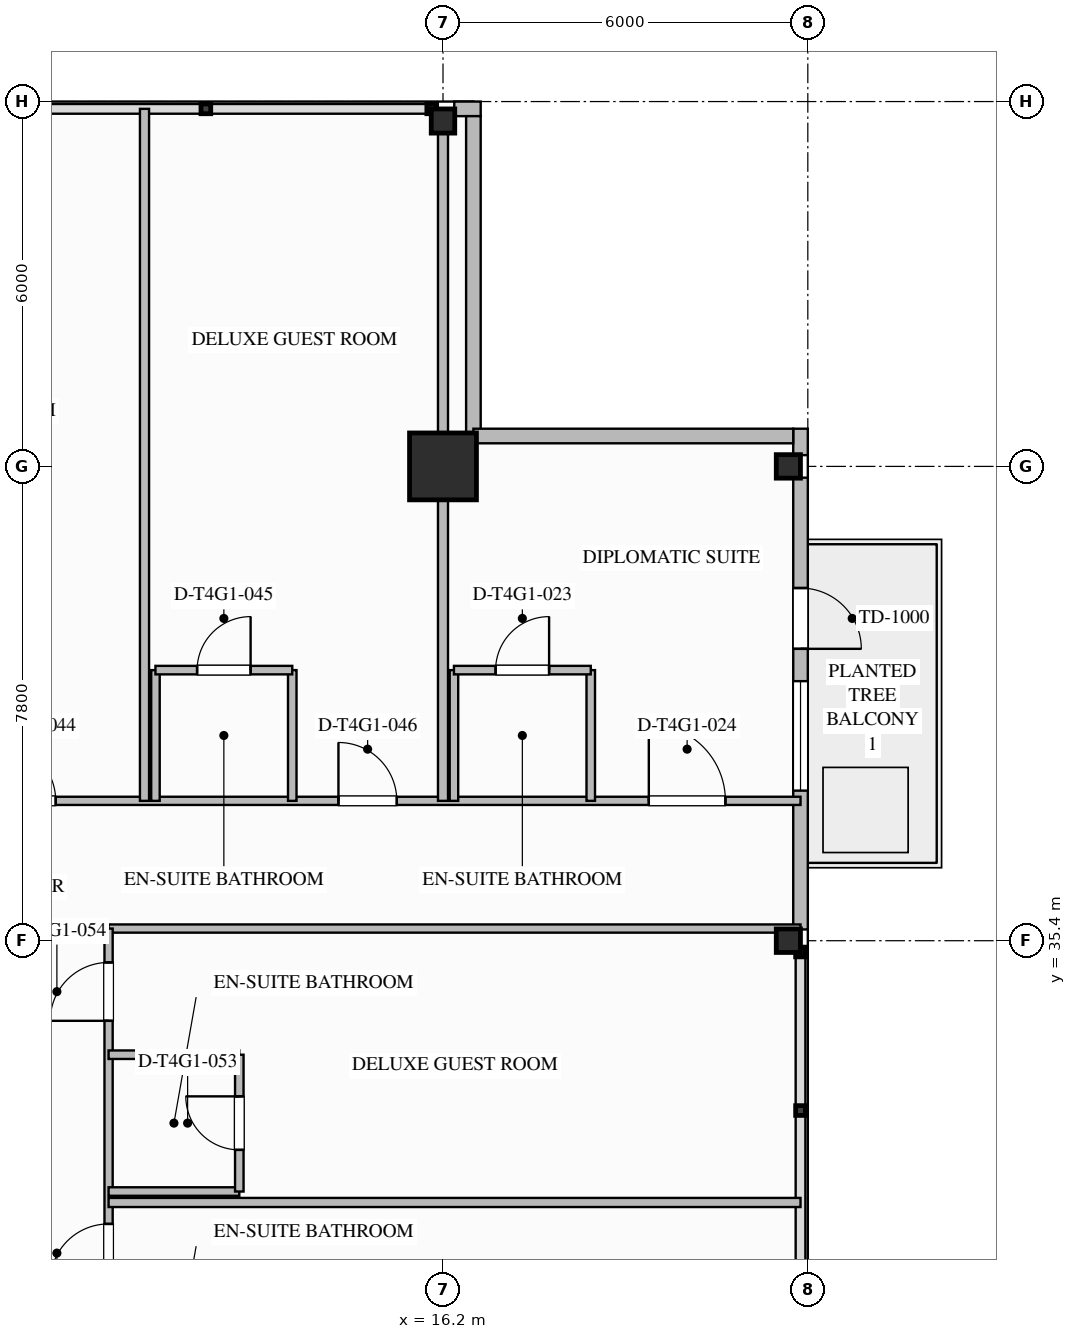
"""IFC4 building model, lengths in metres.
Left out: names, types, materials, properties, quantities, classifications, styles, units other than length and angle.
Written with IfcOpenShell. Run it as: python <this file> out.ifc"""

import sys

from ifc_helpers import new_model, si_unit, direction, frame, frame_2d, origin, origin_2d, place, context, subcontext, project, spatial, rectangle, i_section, extrude, element, fill, save


model = new_model("IFC4")
c1 = context("Model", 3, precision=1e-05, world=origin(), true_north=direction((0.0, 1.0)))
c2 = subcontext(c1, "Body", "Model", "MODEL_VIEW")
j1 = project(units=[si_unit("LENGTHUNIT", "METRE"), si_unit("PLANEANGLEUNIT", "RADIAN")], contexts=[c1])
p1 = place(None, origin())
s1 = spatial("IfcSite", under=j1, at=p1, CompositionType="ELEMENT")
p2 = place(p1, origin())
s2 = spatial("IfcBuilding", under=s1, at=p2, CompositionType="ELEMENT")
p3 = place(p2, frame((0.0, 0.0, 205.1)))
s3 = spatial("IfcBuildingStorey", under=s2, at=p3, CompositionType="ELEMENT", Elevation=205.1)
p4 = place(p3, frame((16.2, 43.2, 0.0), z_axis=(0.0, 0.0, 1.0), x_axis=(1.0, 0.0, 0.0)))
e1 = element("IfcColumn", 1, at=p4, inside=s3, PredefinedType="COLUMN", context=c2, shape_type="SweptSolid", body=[
    extrude(rectangle(XDim=1.1, YDim=1.1, at=origin_2d()), origin(), (0.0, 0.0, 1.0), 3.6),
])
for number, where, z_axis, x_axis in (
    (2, (21.88, 35.4, 0.0), (0.0, 0.0, 1.0), (1.0, 0.0, 0.0)),
    (3, (21.88, 43.2, 0.0), (0.0, 0.0, 1.0), (1.0, 0.0, 0.0)),
    (4, (16.2, 48.88, 0.0), (0.0, 0.0, 1.0), (0.0, 1.0, 0.0)),
):
    element("IfcColumn", number, at=place(p3, frame(where, z_axis=z_axis, x_axis=x_axis)), inside=s3, PredefinedType="COLUMN", context=c2, shape_type="SweptSolid", body=[
        extrude(i_section(OverallWidth=0.397, OverallDepth=0.387, WebThickness=0.021, FlangeThickness=0.033, FilletRadius=0.025, at=origin_2d()), origin(), (0.0, 0.0, 1.0), 3.597),
    ])
p5 = place(p3, frame((22.08, 43.015, 0.0), z_axis=(0.0, 0.0, 1.0), x_axis=(0.0, -1.0, 0.0)))
e5 = element("IfcWall", 5, at=p5, inside=s3, PredefinedType="STANDARD", context=c2, shape_type="SweptSolid", body=[
    extrude(rectangle(XDim=7.429, YDim=0.24, at=frame_2d((3.715, 0.0))), origin(), (0.0, 0.0, 1.0), 2.803),
])
p6 = place(p5, frame((1.815, 0.0, 0.0)))
e6 = element("IfcOpeningElement", 6, at=p6, cuts=e5, PredefinedType="OPENING", context=c2, shape_type="SweptSolid", body=[
    extrude(rectangle(XDim=1.0, YDim=2.2, at=frame_2d((0.5, 1.1))), frame((0.0, 0.13, 0.0), z_axis=(0.0, -1.0, 0.0), x_axis=(1.0, 0.0, 0.0)), (0.0, 0.0, 1.0), 0.26),
])
p7 = place(p5, frame((3.346, 0.0, 0.75)))
e7 = element("IfcOpeningElement", 7, at=p7, cuts=e5, PredefinedType="OPENING", context=c2, shape_type="SweptSolid", body=[
    extrude(rectangle(XDim=1.8, YDim=1.953, at=frame_2d((0.9, 0.977))), frame((0.0, 0.13, 0.0), z_axis=(0.0, -1.0, 0.0), x_axis=(1.0, 0.0, 0.0)), (0.0, 0.0, 1.0), 0.26),
])
for number, where, z_axis, x_axis in (
    (8, (22.08, 43.82, 0.0), (0.0, 0.0, 1.0), (0.0, -1.0, 0.0)),
    (9, (16.385, 49.08, 0.0), (0.0, 0.0, 1.0), (1.0, 0.0, 0.0)),
):
    element("IfcWall", number, at=place(p3, frame(where, z_axis=z_axis, x_axis=x_axis)), inside=s3, PredefinedType="STANDARD", context=c2, shape_type="SweptSolid", body=[
        extrude(rectangle(XDim=0.435, YDim=0.24, at=frame_2d((0.217, 0.0))), origin(), (0.0, 0.0, 1.0), 3.34),
    ])
for number, where, z_axis, x_axis in (
    (10, (16.7, 48.96, 0.0), (0.0, 0.0, 1.0), (0.0, -1.0, 0.0)),
    (11, (16.7, 43.7, 0.0), (0.0, 0.0, 1.0), (1.0, 0.0, 0.0)),
):
    element("IfcWall", number, at=place(p3, frame(where, z_axis=z_axis, x_axis=x_axis)), inside=s3, PredefinedType="STANDARD", context=c2, shape_type="SweptSolid", body=[
        extrude(rectangle(XDim=5.26, YDim=0.24, at=frame_2d((2.63, 0.0))), origin(), (0.0, 0.0, 1.0), 3.34),
    ])
p8 = place(p3, frame((-16.2, 37.7, 0.0), z_axis=(0.0, 0.0, 1.0), x_axis=(1.0, 0.0, 0.0)))
e12 = element("IfcWall", 12, at=p8, inside=s3, PredefinedType="PARTITIONING", context=c2, shape_type="SweptSolid", body=[
    extrude(rectangle(XDim=38.28, YDim=0.135, at=frame_2d((19.14, 0.0))), origin(), (0.0, 0.0, 1.0), 3.34),
])
p9 = place(p8, frame((35.785, 0.0, 0.0)))
e13 = element("IfcOpeningElement", 13, at=p9, cuts=e12, PredefinedType="OPENING", context=c2, shape_type="SweptSolid", body=[
    extrude(rectangle(XDim=1.26, YDim=2.2, at=frame_2d((0.63, 1.1))), frame((0.0, 0.077, 0.0), z_axis=(0.0, -1.0, 0.0), x_axis=(1.0, 0.0, 0.0)), (0.0, 0.0, 1.0), 0.155),
])
p10 = place(p8, frame((3.189, 0.0, 0.0)))
e14 = element("IfcOpeningElement", 14, at=p10, cuts=e12, PredefinedType="OPENING", context=c2, shape_type="SweptSolid", body=[
    extrude(rectangle(XDim=0.96, YDim=2.15, at=frame_2d((0.48, 1.075))), frame((0.0, 0.077, 0.0), z_axis=(0.0, -1.0, 0.0), x_axis=(1.0, 0.0, 0.0)), (0.0, 0.0, 1.0), 0.155),
])
p11 = place(p8, frame((8.379, 0.0, 0.0)))
e15 = element("IfcOpeningElement", 15, at=p11, cuts=e12, PredefinedType="OPENING", context=c2, shape_type="SweptSolid", body=[
    extrude(rectangle(XDim=0.96, YDim=2.15, at=frame_2d((0.48, 1.075))), frame((0.0, 0.077, 0.0), z_axis=(0.0, -1.0, 0.0), x_axis=(1.0, 0.0, 0.0)), (0.0, 0.0, 1.0), 0.155),
])
p12 = place(p8, frame((14.025, 0.0, 0.0)))
e16 = element("IfcOpeningElement", 16, at=p12, cuts=e12, PredefinedType="OPENING", context=c2, shape_type="SweptSolid", body=[
    extrude(rectangle(XDim=0.96, YDim=2.15, at=frame_2d((0.48, 1.075))), frame((0.0, 0.077, 0.0), z_axis=(0.0, -1.0, 0.0), x_axis=(1.0, 0.0, 0.0)), (0.0, 0.0, 1.0), 0.155),
])
p13 = place(p8, frame((18.18, 0.0, 0.0)))
e17 = element("IfcOpeningElement", 17, at=p13, cuts=e12, PredefinedType="OPENING", context=c2, shape_type="SweptSolid", body=[
    extrude(rectangle(XDim=1.02, YDim=2.15, at=frame_2d((0.51, 1.075))), frame((0.0, 0.077, 0.0), z_axis=(0.0, -1.0, 0.0), x_axis=(1.0, 0.0, 0.0)), (0.0, 0.0, 1.0), 0.155),
])
p14 = place(p8, frame((25.071, 0.0, 0.0)))
e18 = element("IfcOpeningElement", 18, at=p14, cuts=e12, PredefinedType="OPENING", context=c2, shape_type="SweptSolid", body=[
    extrude(rectangle(XDim=0.96, YDim=2.15, at=frame_2d((0.48, 1.075))), frame((0.0, 0.077, 0.0), z_axis=(0.0, -1.0, 0.0), x_axis=(1.0, 0.0, 0.0)), (0.0, 0.0, 1.0), 0.155),
])
p15 = place(p8, frame((30.68, 0.0, 0.0)))
e19 = element("IfcOpeningElement", 19, at=p15, cuts=e12, PredefinedType="OPENING", context=c2, shape_type="SweptSolid", body=[
    extrude(rectangle(XDim=0.96, YDim=2.15, at=frame_2d((0.48, 1.075))), frame((0.0, 0.077, 0.0), z_axis=(0.0, -1.0, 0.0), x_axis=(1.0, 0.0, 0.0)), (0.0, 0.0, 1.0), 0.155),
])
p16 = place(p3, frame((10.7, 35.6, 0.0), z_axis=(0.0, 0.0, 1.0), x_axis=(1.0, 0.0, 0.0)))
e20 = element("IfcWall", 20, at=p16, inside=s3, PredefinedType="PARTITIONING", context=c2, shape_type="SweptSolid", body=[
    extrude(rectangle(XDim=11.38, YDim=0.135, at=frame_2d((5.69, 0.0))), origin(), (0.0, 0.0, 1.0), 2.717),
])
p17 = place(p3, frame((10.7, 18.4, 0.0), z_axis=(0.0, 0.0, 1.0), x_axis=(0.0, 1.0, 0.0)))
e21 = element("IfcWall", 21, at=p17, inside=s3, PredefinedType="PARTITIONING", context=c2, shape_type="SweptSolid", body=[
    extrude(rectangle(XDim=17.2, YDim=0.135, at=frame_2d((8.6, 0.0))), origin(), (0.0, 0.0, 1.0), 3.34),
])
p18 = place(p17, frame((2.987, 0.0, 0.0)))
e22 = element("IfcOpeningElement", 22, at=p18, cuts=e21, PredefinedType="OPENING", context=c2, shape_type="SweptSolid", body=[
    extrude(rectangle(XDim=0.96, YDim=2.15, at=frame_2d((0.48, 1.075))), frame((0.0, 0.077, 0.0), z_axis=(0.0, -1.0, 0.0), x_axis=(1.0, 0.0, 0.0)), (0.0, 0.0, 1.0), 0.155),
])
p19 = place(p17, frame((7.287, 0.0, 0.0)))
e23 = element("IfcOpeningElement", 23, at=p19, cuts=e21, PredefinedType="OPENING", context=c2, shape_type="SweptSolid", body=[
    extrude(rectangle(XDim=0.96, YDim=2.15, at=frame_2d((0.48, 1.075))), frame((0.0, 0.077, 0.0), z_axis=(0.0, -1.0, 0.0), x_axis=(1.0, 0.0, 0.0)), (0.0, 0.0, 1.0), 0.155),
])
p20 = place(p17, frame((11.383, 0.0, 0.0)))
e24 = element("IfcOpeningElement", 24, at=p20, cuts=e21, PredefinedType="OPENING", context=c2, shape_type="SweptSolid", body=[
    extrude(rectangle(XDim=0.96, YDim=2.15, at=frame_2d((0.48, 1.075))), frame((0.0, 0.077, 0.0), z_axis=(0.0, -1.0, 0.0), x_axis=(1.0, 0.0, 0.0)), (0.0, 0.0, 1.0), 0.155),
])
p21 = place(p17, frame((15.683, 0.0, 0.0)))
e25 = element("IfcOpeningElement", 25, at=p21, cuts=e21, PredefinedType="OPENING", context=c2, shape_type="SweptSolid", body=[
    extrude(rectangle(XDim=0.96, YDim=2.15, at=frame_2d((0.48, 1.075))), frame((0.0, 0.077, 0.0), z_axis=(0.0, -1.0, 0.0), x_axis=(1.0, 0.0, 0.0)), (0.0, 0.0, 1.0), 0.155),
])
p22 = place(p3, frame((16.2, 37.7, 0.0), z_axis=(0.0, 0.0, 1.0), x_axis=(0.0, 1.0, 0.0)))
e26 = element("IfcWall", 26, at=p22, inside=s3, PredefinedType="PARTITIONING", context=c2, shape_type="SweptSolid", body=[
    extrude(rectangle(XDim=11.38, YDim=0.165, at=frame_2d((5.69, 0.0))), origin(), (0.0, 0.0, 1.0), 2.714),
])
p23 = place(p3, frame((16.38, 37.7, 0.0), z_axis=(0.0, 0.0, 1.0), x_axis=(0.0, 1.0, 0.0)))
e27 = element("IfcWall", 27, at=p23, inside=s3, PredefinedType="PLUMBINGWALL", context=c2, shape_type="SweptSolid", body=[
    extrude(rectangle(XDim=2.15, YDim=0.14, at=frame_2d((1.075, 0.0))), origin(), (0.0, 0.0, 1.0), 2.714),
])
p24 = place(p3, frame((18.63, 37.7, 0.0), z_axis=(0.0, 0.0, 1.0), x_axis=(0.0, 1.0, 0.0)))
e28 = element("IfcWall", 28, at=p24, inside=s3, PredefinedType="PLUMBINGWALL", context=c2, shape_type="SweptSolid", body=[
    extrude(rectangle(XDim=2.15, YDim=0.14, at=frame_2d((1.075, 0.0))), origin(), (0.0, 0.0, 1.0), 3.34),
])
p25 = place(p3, frame((16.38, 39.85, 0.0), z_axis=(0.0, 0.0, 1.0), x_axis=(1.0, 0.0, 0.0)))
e29 = element("IfcWall", 29, at=p25, inside=s3, PredefinedType="PLUMBINGWALL", context=c2, shape_type="SweptSolid", body=[
    extrude(rectangle(XDim=2.25, YDim=0.14, at=frame_2d((1.125, 0.0))), origin(), (0.0, 0.0, 1.0), 3.34),
])
p26 = place(p25, frame((0.685, 0.0, 0.0)))
e30 = element("IfcOpeningElement", 30, at=p26, cuts=e29, PredefinedType="OPENING", context=c2, shape_type="SweptSolid", body=[
    extrude(rectangle(XDim=0.88, YDim=2.1, at=frame_2d((0.44, 1.05))), frame((0.0, 0.08, 0.0), z_axis=(0.0, -1.0, 0.0), x_axis=(1.0, 0.0, 0.0)), (0.0, 0.0, 1.0), 0.16),
])
p27 = place(p3, frame((11.291, 37.7, 0.0), z_axis=(0.0, 0.0, 1.0), x_axis=(0.0, 1.0, 0.0)))
e31 = element("IfcWall", 31, at=p27, inside=s3, PredefinedType="PARTITIONING", context=c2, shape_type="SweptSolid", body=[
    extrude(rectangle(XDim=11.38, YDim=0.15, at=frame_2d((5.69, 0.0))), origin(), (0.0, 0.0, 1.0), 3.34),
])
for number, where, z_axis, x_axis in (
    (32, (11.471, 37.7, 0.0), (0.0, 0.0, 1.0), (0.0, 1.0, 0.0)),
    (33, (13.721, 37.7, 0.0), (0.0, 0.0, 1.0), (0.0, 1.0, 0.0)),
):
    element("IfcWall", number, at=place(p3, frame(where, z_axis=z_axis, x_axis=x_axis)), inside=s3, PredefinedType="PLUMBINGWALL", context=c2, shape_type="SweptSolid", body=[
        extrude(rectangle(XDim=2.15, YDim=0.14, at=frame_2d((1.075, 0.0))), origin(), (0.0, 0.0, 1.0), 3.34),
    ])
p28 = place(p3, frame((11.471, 39.85, 0.0), z_axis=(0.0, 0.0, 1.0), x_axis=(1.0, 0.0, 0.0)))
e34 = element("IfcWall", 34, at=p28, inside=s3, PredefinedType="PLUMBINGWALL", context=c2, shape_type="SweptSolid", body=[
    extrude(rectangle(XDim=2.25, YDim=0.14, at=frame_2d((1.125, 0.0))), origin(), (0.0, 0.0, 1.0), 3.34),
])
p29 = place(p28, frame((0.685, 0.0, 0.0)))
e35 = element("IfcOpeningElement", 35, at=p29, cuts=e34, PredefinedType="OPENING", context=c2, shape_type="SweptSolid", body=[
    extrude(rectangle(XDim=0.88, YDim=2.1, at=frame_2d((0.44, 1.05))), frame((0.0, 0.08, 0.0), z_axis=(0.0, -1.0, 0.0), x_axis=(1.0, 0.0, 0.0)), (0.0, 0.0, 1.0), 0.16),
])
p30 = place(p3, frame((10.7, 31.095, 0.0), z_axis=(0.0, 0.0, 1.0), x_axis=(1.0, 0.0, 0.0)))
e36 = element("IfcWall", 36, at=p30, inside=s3, PredefinedType="PARTITIONING", context=c2, shape_type="SweptSolid", body=[
    extrude(rectangle(XDim=11.38, YDim=0.15, at=frame_2d((5.69, 0.0))), origin(), (0.0, 0.0, 1.0), 3.34),
])
for number, where, z_axis, x_axis in (
    (37, (10.7, 31.275, 0.0), (0.0, 0.0, 1.0), (1.0, 0.0, 0.0)),
    (38, (10.7, 33.525, 0.0), (0.0, 0.0, 1.0), (1.0, 0.0, 0.0)),
):
    element("IfcWall", number, at=place(p3, frame(where, z_axis=z_axis, x_axis=x_axis)), inside=s3, PredefinedType="PLUMBINGWALL", context=c2, shape_type="SweptSolid", body=[
        extrude(rectangle(XDim=2.15, YDim=0.14, at=frame_2d((1.075, 0.0))), origin(), (0.0, 0.0, 1.0), 3.34),
    ])
p31 = place(p3, frame((12.85, 31.275, 0.0), z_axis=(0.0, 0.0, 1.0), x_axis=(0.0, 1.0, 0.0)))
e39 = element("IfcWall", 39, at=p31, inside=s3, PredefinedType="PLUMBINGWALL", context=c2, shape_type="SweptSolid", body=[
    extrude(rectangle(XDim=2.25, YDim=0.14, at=frame_2d((1.125, 0.0))), origin(), (0.0, 0.0, 1.0), 3.34),
])
p32 = place(p31, frame((0.685, 0.0, 0.0)))
e40 = element("IfcOpeningElement", 40, at=p32, cuts=e39, PredefinedType="OPENING", context=c2, shape_type="SweptSolid", body=[
    extrude(rectangle(XDim=0.88, YDim=2.1, at=frame_2d((0.44, 1.05))), frame((0.0, 0.08, 0.0), z_axis=(0.0, -1.0, 0.0), x_axis=(1.0, 0.0, 0.0)), (0.0, 0.0, 1.0), 0.16),
])
p33 = place(p6, origin())
e41 = element("IfcDoor", 41, at=p33, inside=s3, OperationType="SINGLE_SWING_RIGHT", PredefinedType="DOOR", context=c2, shape_type="SweptSolid", body=[
    extrude(rectangle(XDim=1.0, YDim=2.2, at=frame_2d((0.5, 1.1))), frame((0.0, 0.025, 0.0), z_axis=(0.0, -1.0, 0.0), x_axis=(1.0, 0.0, 0.0)), (0.0, 0.0, 1.0), 0.05),
])
fill(e6, e41)
p34 = place(p7, origin())
e42 = element("IfcWindow", 42, at=p34, inside=s3, PartitioningType="SINGLE_PANEL", PredefinedType="WINDOW", context=c2, shape_type="SweptSolid", body=[
    extrude(rectangle(XDim=1.8, YDim=1.953, at=frame_2d((0.9, 0.977))), frame((0.0, 0.03, 0.0), z_axis=(0.0, -1.0, 0.0), x_axis=(1.0, 0.0, 0.0)), (0.0, 0.0, 1.0), 0.06),
])
fill(e7, e42)
p35 = place(p26, origin())
e43 = element("IfcDoor", 43, at=p35, inside=s3, OperationType="SINGLE_SWING_RIGHT", PredefinedType="DOOR", context=c2, shape_type="SweptSolid", body=[
    extrude(rectangle(XDim=0.88, YDim=2.1, at=frame_2d((0.44, 1.05))), frame((0.0, 0.025, 0.0), z_axis=(0.0, -1.0, 0.0), x_axis=(1.0, 0.0, 0.0)), (0.0, 0.0, 1.0), 0.05),
])
fill(e30, e43)
p36 = place(p9, origin())
e44 = element("IfcDoor", 44, at=p36, inside=s3, OperationType="SINGLE_SWING_LEFT", PredefinedType="DOOR", context=c2, shape_type="SweptSolid", body=[
    extrude(rectangle(XDim=1.26, YDim=2.2, at=frame_2d((0.63, 1.1))), frame((0.0, 0.025, 0.0), z_axis=(0.0, -1.0, 0.0), x_axis=(1.0, 0.0, 0.0)), (0.0, 0.0, 1.0), 0.05),
])
fill(e13, e44)
p37 = place(p14, origin())
e45 = element("IfcDoor", 45, at=p37, inside=s3, OperationType="SINGLE_SWING_LEFT", PredefinedType="DOOR", context=c2, shape_type="SweptSolid", body=[
    extrude(rectangle(XDim=0.96, YDim=2.15, at=frame_2d((0.48, 1.075))), frame((0.0, 0.025, 0.0), z_axis=(0.0, -1.0, 0.0), x_axis=(1.0, 0.0, 0.0)), (0.0, 0.0, 1.0), 0.05),
])
fill(e18, e45)
p38 = place(p29, origin())
e46 = element("IfcDoor", 46, at=p38, inside=s3, OperationType="SINGLE_SWING_RIGHT", PredefinedType="DOOR", context=c2, shape_type="SweptSolid", body=[
    extrude(rectangle(XDim=0.88, YDim=2.1, at=frame_2d((0.44, 1.05))), frame((0.0, 0.025, 0.0), z_axis=(0.0, -1.0, 0.0), x_axis=(1.0, 0.0, 0.0)), (0.0, 0.0, 1.0), 0.05),
])
fill(e35, e46)
p39 = place(p15, origin())
e47 = element("IfcDoor", 47, at=p39, inside=s3, OperationType="SINGLE_SWING_LEFT", PredefinedType="DOOR", context=c2, shape_type="SweptSolid", body=[
    extrude(rectangle(XDim=0.96, YDim=2.15, at=frame_2d((0.48, 1.075))), frame((0.0, 0.025, 0.0), z_axis=(0.0, -1.0, 0.0), x_axis=(1.0, 0.0, 0.0)), (0.0, 0.0, 1.0), 0.05),
])
fill(e19, e47)
p40 = place(p20, origin())
e48 = element("IfcDoor", 48, at=p40, inside=s3, OperationType="SINGLE_SWING_LEFT", PredefinedType="DOOR", context=c2, shape_type="SweptSolid", body=[
    extrude(rectangle(XDim=0.96, YDim=2.15, at=frame_2d((0.48, 1.075))), frame((0.0, 0.025, 0.0), z_axis=(0.0, -1.0, 0.0), x_axis=(1.0, 0.0, 0.0)), (0.0, 0.0, 1.0), 0.05),
])
fill(e24, e48)
p41 = place(p32, origin())
e49 = element("IfcDoor", 49, at=p41, inside=s3, OperationType="SINGLE_SWING_RIGHT", PredefinedType="DOOR", context=c2, shape_type="SweptSolid", body=[
    extrude(rectangle(XDim=0.88, YDim=2.1, at=frame_2d((0.44, 1.05))), frame((0.0, 0.025, 0.0), z_axis=(0.0, -1.0, 0.0), x_axis=(1.0, 0.0, 0.0)), (0.0, 0.0, 1.0), 0.05),
])
fill(e40, e49)
p42 = place(p21, origin())
e50 = element("IfcDoor", 50, at=p42, inside=s3, OperationType="SINGLE_SWING_LEFT", PredefinedType="DOOR", context=c2, shape_type="SweptSolid", body=[
    extrude(rectangle(XDim=0.96, YDim=2.15, at=frame_2d((0.48, 1.075))), frame((0.0, 0.025, 0.0), z_axis=(0.0, -1.0, 0.0), x_axis=(1.0, 0.0, 0.0)), (0.0, 0.0, 1.0), 0.05),
])
fill(e25, e50)
save(model, sys.argv[1])
